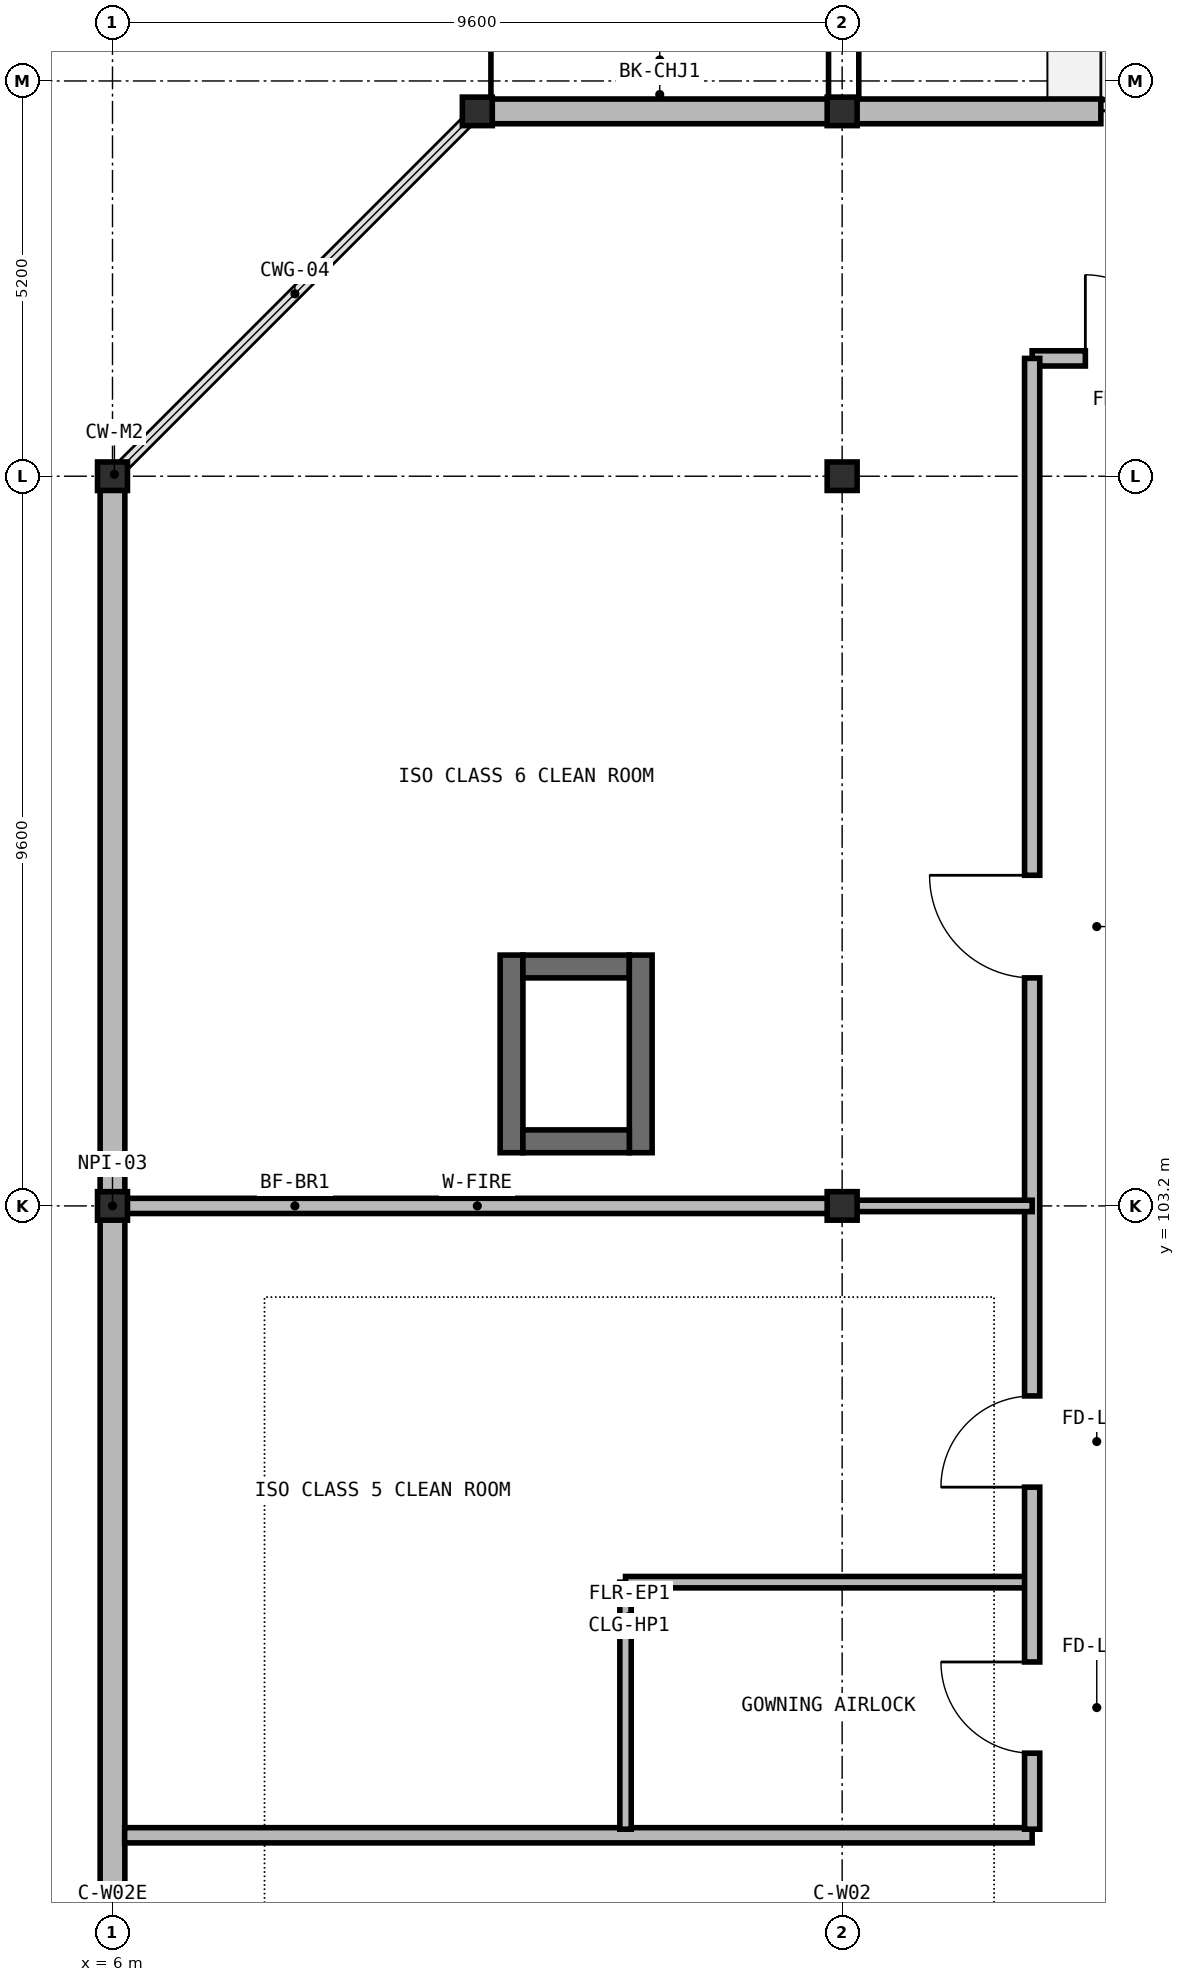
"""IFC4 building model, lengths in metres.
Left out: names, types, materials, properties, quantities, classifications, styles, units other than length and angle.
Written with IfcOpenShell. Run it as: python <this file> out.ifc"""

import sys

from ifc_helpers import new_model, si_unit, direction, frame, frame_2d, origin, origin_2d, place, context, subcontext, project, spatial, rectangle, i_section, extrude, element, fill, save


model = new_model("IFC4")
c1 = context("Model", 3, precision=1e-05, world=origin(), true_north=direction((0.0, 1.0)))
c2 = subcontext(c1, "Body", "Model", "MODEL_VIEW")
j1 = project(units=[si_unit("LENGTHUNIT", "METRE"), si_unit("PLANEANGLEUNIT", "RADIAN")], contexts=[c1])
p1 = place(None, origin())
s1 = spatial("IfcSite", under=j1, at=p1, CompositionType="ELEMENT")
p2 = place(p1, origin())
s2 = spatial("IfcBuilding", under=s1, at=p2, CompositionType="ELEMENT")
p3 = place(p2, origin())
s3 = spatial("IfcBuildingStorey", under=s2, at=p3, CompositionType="ELEMENT", Elevation=0.0)
for number, where, z_axis, x_axis in (
    (1, (6.0, 103.2, 0.0), (0.0, 0.0, 1.0), (1.0, 0.0, 0.0)),
    (2, (6.0, 112.8, 0.0), (0.0, 0.0, 1.0), (1.0, 0.0, 0.0)),
    (3, (15.6, 103.2, 0.0), (0.0, 0.0, 1.0), (1.0, 0.0, 0.0)),
    (4, (15.6, 112.8, 0.0), (0.0, 0.0, 1.0), (1.0, 0.0, 0.0)),
    (5, (15.6, 117.6, 0.0), (0.0, 0.0, 1.0), (1.0, 0.0, 0.0)),
    (6, (10.8, 117.6, 0.0), (0.0, 0.0, 1.0), (1.0, 0.0, 0.0)),
):
    element("IfcColumn", number, at=place(p3, frame(where, z_axis=z_axis, x_axis=x_axis)), inside=s3, PredefinedType="COLUMN", context=c2, shape_type="SweptSolid", body=[
        extrude(i_section(OverallWidth=0.394, OverallDepth=0.375, WebThickness=0.02, FlangeThickness=0.032, at=origin_2d()), origin(), (0.0, 0.0, 1.0), 5.25),
    ])
p4 = place(p3, frame((11.25, 103.9, 0.0), z_axis=(0.0, 0.0, 1.0), x_axis=(0.0, 1.0, 0.0)))
e7 = element("IfcWall", 7, at=p4, inside=s3, PredefinedType="SHEAR", context=c2, shape_type="SweptSolid", body=[
    extrude(rectangle(XDim=2.6, YDim=0.3, at=frame_2d((1.3, 0.0))), origin(), (0.0, 0.0, 1.0), 5.07),
])
p5 = place(p3, frame((11.4, 106.35, 0.0), z_axis=(0.0, 0.0, 1.0), x_axis=(1.0, 0.0, 0.0)))
e8 = element("IfcWall", 8, at=p5, inside=s3, PredefinedType="SHEAR", context=c2, shape_type="SweptSolid", body=[
    extrude(rectangle(XDim=1.4, YDim=0.3, at=frame_2d((0.7, 0.0))), origin(), (0.0, 0.0, 1.0), 5.07),
])
p6 = place(p3, frame((12.95, 106.5, 0.0), z_axis=(0.0, 0.0, 1.0), x_axis=(0.0, -1.0, 0.0)))
e9 = element("IfcWall", 9, at=p6, inside=s3, PredefinedType="SHEAR", context=c2, shape_type="SweptSolid", body=[
    extrude(rectangle(XDim=2.6, YDim=0.3, at=frame_2d((1.3, 0.0))), origin(), (0.0, 0.0, 1.0), 5.07),
])
p7 = place(p3, frame((12.8, 104.05, 0.0), z_axis=(0.0, 0.0, 1.0), x_axis=(-1.0, 0.0, 0.0)))
e10 = element("IfcWall", 10, at=p7, inside=s3, PredefinedType="SHEAR", context=c2, shape_type="SweptSolid", body=[
    extrude(rectangle(XDim=1.4, YDim=0.3, at=frame_2d((0.7, 0.0))), origin(), (0.0, 0.0, 1.0), 5.07),
])
p8 = place(p3, frame((6.0, 93.604, 0.0), z_axis=(0.0, 0.0, 1.0), x_axis=(0.0, 1.0, 0.0)))
e11 = element("IfcWall", 11, at=p8, inside=s3, PredefinedType="SOLIDWALL", context=c2, shape_type="SweptSolid", body=[
    extrude(rectangle(XDim=9.592, YDim=0.325, at=frame_2d((4.796, 0.0))), origin(), (0.0, 0.0, 1.0), 4.444),
])
p9 = place(p3, frame((6.0, 103.204, 0.0), z_axis=(0.0, 0.0, 1.0), x_axis=(0.0, 1.0, 0.0)))
e12 = element("IfcWall", 12, at=p9, inside=s3, PredefinedType="SOLIDWALL", context=c2, shape_type="SweptSolid", body=[
    extrude(rectangle(XDim=9.592, YDim=0.325, at=frame_2d((4.796, 0.0))), origin(), (0.0, 0.0, 1.0), 4.444),
])
p10 = place(p3, frame((10.804, 117.6, 0.0), z_axis=(0.0, 0.0, 1.0), x_axis=(1.0, 0.0, 0.0)))
e13 = element("IfcWall", 13, at=p10, inside=s3, PredefinedType="SOLIDWALL", context=c2, shape_type="SweptSolid", body=[
    extrude(rectangle(XDim=4.792, YDim=0.325, at=frame_2d((2.396, 0.0))), origin(), (0.0, 0.0, 1.0), 4.93),
])
p11 = place(p3, frame((15.604, 117.6, 0.0), z_axis=(0.0, 0.0, 1.0), x_axis=(1.0, 0.0, 0.0)))
e14 = element("IfcWall", 14, at=p11, inside=s3, PredefinedType="SOLIDWALL", context=c2, shape_type="SweptSolid", body=[
    extrude(rectangle(XDim=9.592, YDim=0.325, at=frame_2d((4.796, 0.0))), origin(), (0.0, 0.0, 1.0), 4.444),
])
p12 = place(p11, frame((3.4, 0.0, 0.0)))
e15 = element("IfcOpeningElement", 15, at=p12, cuts=e14, PredefinedType="OPENING", context=c2, shape_type="SweptSolid", body=[
    extrude(rectangle(XDim=1.8, YDim=2.25, at=frame_2d((0.9, 1.125))), frame((0.0, 0.172, 0.0), z_axis=(0.0, -1.0, 0.0), x_axis=(1.0, 0.0, 0.0)), (0.0, 0.0, 1.0), 0.345),
])
p13 = place(p3, frame((6.16, 103.2, 0.0), z_axis=(0.0, 0.0, 1.0), x_axis=(1.0, 0.0, 0.0)))
e16 = element("IfcWall", 16, at=p13, inside=s3, PredefinedType="SOLIDWALL", context=c2, shape_type="SweptSolid", body=[
    extrude(rectangle(XDim=9.28, YDim=0.2, at=frame_2d((4.64, 0.0))), origin(), (0.0, 0.0, 1.0), 4.376),
])
p14 = place(p3, frame((18.1, 114.35, 0.0), z_axis=(0.0, 0.0, 1.0), x_axis=(1.0, 0.0, 0.0)))
e17 = element("IfcWall", 17, at=p14, inside=s3, PredefinedType="SOLIDWALL", context=c2, shape_type="SweptSolid", body=[
    extrude(rectangle(XDim=2.65, YDim=0.2, at=frame_2d((1.325, 0.0))), origin(), (0.0, 0.0, 1.0), 4.93),
])
p15 = place(p14, frame((0.7, 0.0, 0.0)))
e18 = element("IfcOpeningElement", 18, at=p15, cuts=e17, PredefinedType="OPENING", context=c2, shape_type="SweptSolid", body=[
    extrude(rectangle(XDim=1.1, YDim=2.15, at=frame_2d((0.55, 1.075))), frame((0.0, 0.11, 0.0), z_axis=(0.0, -1.0, 0.0), x_axis=(1.0, 0.0, 0.0)), (0.0, 0.0, 1.0), 0.22),
])
p16 = place(p3, frame((6.16, 94.92, 0.0), z_axis=(0.0, 0.0, 1.0), x_axis=(1.0, 0.0, 0.0)))
e19 = element("IfcWall", 19, at=p16, inside=s3, PredefinedType="SOLIDWALL", context=c2, shape_type="SweptSolid", body=[
    extrude(rectangle(XDim=11.94, YDim=0.2, at=frame_2d((5.97, 0.0))), origin(), (0.0, 0.0, 1.0), 4.93),
])
p17 = place(p3, frame((12.75, 95.0, 0.0), z_axis=(0.0, 0.0, 1.0), x_axis=(0.0, 1.0, 0.0)))
e20 = element("IfcWall", 20, at=p17, inside=s3, PredefinedType="PARTITIONING", context=c2, shape_type="SweptSolid", body=[
    extrude(rectangle(XDim=3.25, YDim=0.15, at=frame_2d((1.625, 0.0))), origin(), (0.0, 0.0, 1.0), 4.93),
])
p18 = place(p3, frame((12.75, 98.25, 0.0), z_axis=(0.0, 0.0, 1.0), x_axis=(1.0, 0.0, 0.0)))
e21 = element("IfcWall", 21, at=p18, inside=s3, PredefinedType="PARTITIONING", context=c2, shape_type="SweptSolid", body=[
    extrude(rectangle(XDim=5.35, YDim=0.15, at=frame_2d((2.675, 0.0))), origin(), (0.0, 0.0, 1.0), 4.93),
])
p19 = place(p3, frame((18.1, 95.0, 0.0), z_axis=(0.0, 0.0, 1.0), x_axis=(0.0, 1.0, 0.0)))
e22 = element("IfcWall", 22, at=p19, inside=s3, PredefinedType="SOLIDWALL", context=c2, shape_type="SweptSolid", body=[
    extrude(rectangle(XDim=19.35, YDim=0.2, at=frame_2d((9.675, 0.0))), origin(), (0.0, 0.0, 1.0), 4.93),
])
p20 = place(p19, frame((1.0, 0.0, 0.0)))
e23 = element("IfcOpeningElement", 23, at=p20, cuts=e22, PredefinedType="OPENING", context=c2, shape_type="SweptSolid", body=[
    extrude(rectangle(XDim=1.2, YDim=2.2, at=frame_2d((0.6, 1.1))), frame((0.0, 0.11, 0.0), z_axis=(0.0, -1.0, 0.0), x_axis=(1.0, 0.0, 0.0)), (0.0, 0.0, 1.0), 0.22),
])
p21 = place(p19, frame((4.5, 0.0, 0.0)))
e24 = element("IfcOpeningElement", 24, at=p21, cuts=e22, PredefinedType="OPENING", context=c2, shape_type="SweptSolid", body=[
    extrude(rectangle(XDim=1.2, YDim=2.2, at=frame_2d((0.6, 1.1))), frame((0.0, 0.11, 0.0), z_axis=(0.0, -1.0, 0.0), x_axis=(1.0, 0.0, 0.0)), (0.0, 0.0, 1.0), 0.22),
])
p22 = place(p19, frame((11.2, 0.0, 0.0)))
e25 = element("IfcOpeningElement", 25, at=p22, cuts=e22, PredefinedType="OPENING", context=c2, shape_type="SweptSolid", body=[
    extrude(rectangle(XDim=1.35, YDim=2.2, at=frame_2d((0.675, 1.1))), frame((0.0, 0.11, 0.0), z_axis=(0.0, -1.0, 0.0), x_axis=(1.0, 0.0, 0.0)), (0.0, 0.0, 1.0), 0.22),
])
p23 = place(p3, frame((15.55, 103.2, 0.0), z_axis=(0.0, 0.0, 1.0), x_axis=(1.0, 0.0, 0.0)))
e26 = element("IfcWall", 26, at=p23, inside=s3, PredefinedType="PARTITIONING", context=c2, shape_type="SweptSolid", body=[
    extrude(rectangle(XDim=2.55, YDim=0.15, at=frame_2d((1.275, 0.0))), origin(), (0.0, 0.0, 1.0), 4.376),
])
p24 = place(p12, origin())
e27 = element("IfcDoor", 27, at=p24, inside=s3, OperationType="DOUBLE_DOOR_SINGLE_SWING", PredefinedType="DOOR", context=c2, shape_type="SweptSolid", body=[
    extrude(rectangle(XDim=1.8, YDim=2.25, at=frame_2d((0.9, 1.125))), frame((0.0, 0.025, 0.0), z_axis=(0.0, -1.0, 0.0), x_axis=(1.0, 0.0, 0.0)), (0.0, 0.0, 1.0), 0.05),
])
fill(e15, e27)
p25 = place(p15, origin())
e28 = element("IfcDoor", 28, at=p25, inside=s3, OperationType="SINGLE_SWING_LEFT", PredefinedType="DOOR", context=c2, shape_type="SweptSolid", body=[
    extrude(rectangle(XDim=1.1, YDim=2.15, at=frame_2d((0.55, 1.075))), frame((0.0, 0.025, 0.0), z_axis=(0.0, -1.0, 0.0), x_axis=(1.0, 0.0, 0.0)), (0.0, 0.0, 1.0), 0.05),
])
fill(e18, e28)
p26 = place(p20, origin())
e29 = element("IfcDoor", 29, at=p26, inside=s3, OperationType="SINGLE_SWING_RIGHT", PredefinedType="DOOR", context=c2, shape_type="SweptSolid", body=[
    extrude(rectangle(XDim=1.2, YDim=2.2, at=frame_2d((0.6, 1.1))), frame((0.0, 0.025, 0.0), z_axis=(0.0, -1.0, 0.0), x_axis=(1.0, 0.0, 0.0)), (0.0, 0.0, 1.0), 0.05),
])
fill(e23, e29)
p27 = place(p21, origin())
e30 = element("IfcDoor", 30, at=p27, inside=s3, OperationType="SINGLE_SWING_LEFT", PredefinedType="DOOR", context=c2, shape_type="SweptSolid", body=[
    extrude(rectangle(XDim=1.2, YDim=2.2, at=frame_2d((0.6, 1.1))), frame((0.0, 0.025, 0.0), z_axis=(0.0, -1.0, 0.0), x_axis=(1.0, 0.0, 0.0)), (0.0, 0.0, 1.0), 0.05),
])
fill(e24, e30)
p28 = place(p22, origin())
e31 = element("IfcDoor", 31, at=p28, inside=s3, OperationType="SINGLE_SWING_RIGHT", PredefinedType="DOOR", context=c2, shape_type="SweptSolid", body=[
    extrude(rectangle(XDim=1.35, YDim=2.2, at=frame_2d((0.675, 1.1))), frame((0.0, 0.025, 0.0), z_axis=(0.0, -1.0, 0.0), x_axis=(1.0, 0.0, 0.0)), (0.0, 0.0, 1.0), 0.05),
])
fill(e25, e31)
save(model, sys.argv[1])
